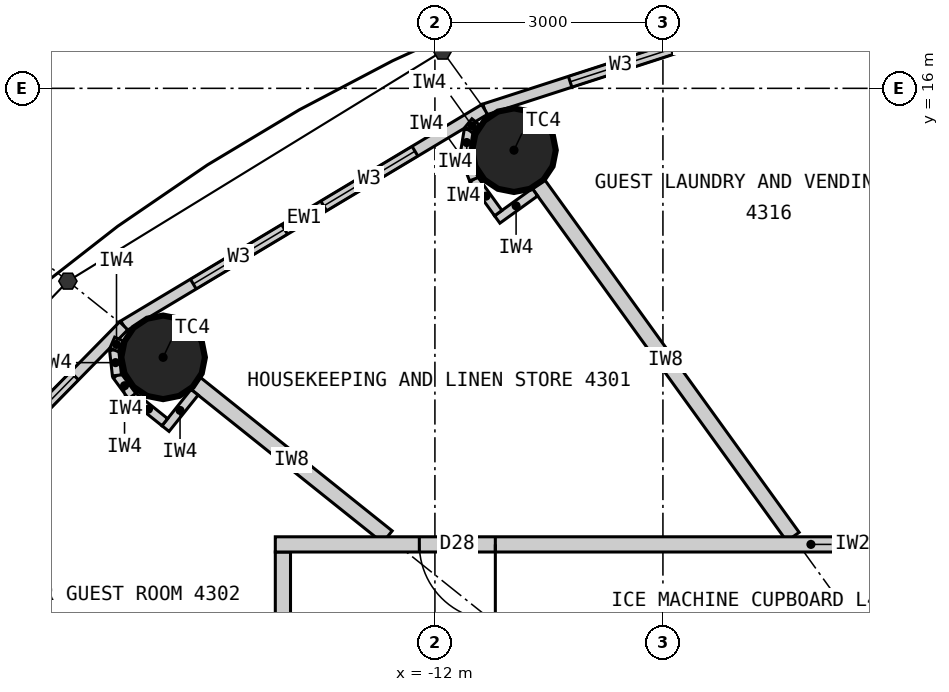
"""IFC4 building model, lengths in metres.
Left out: names, types, materials, properties, quantities, classifications, styles, units other than length and angle.
Written with IfcOpenShell. Run it as: python <this file> out.ifc"""

import sys

from ifc_helpers import new_model, si_unit, direction, frame, frame_2d, origin, origin_2d, place, context, subcontext, project, spatial, rectangle, circle, extrude, element, fill, save


model = new_model("IFC4")
c1 = context("Model", 3, precision=1e-05, world=origin(), true_north=direction((0.0, 1.0)))
c2 = subcontext(c1, "Body", "Model", "MODEL_VIEW")
j1 = project(units=[si_unit("LENGTHUNIT", "METRE"), si_unit("PLANEANGLEUNIT", "RADIAN")], contexts=[c1])
p1 = place(None, origin())
s1 = spatial("IfcSite", under=j1, at=p1, CompositionType="ELEMENT")
p2 = place(p1, origin())
s2 = spatial("IfcBuilding", under=s1, at=p2, CompositionType="ELEMENT")
p3 = place(p2, frame((0.0, 0.0, 163.2)))
s3 = spatial("IfcBuildingStorey", under=s2, at=p3, CompositionType="ELEMENT", Elevation=163.2)
for number, where, z_axis, x_axis in (
    (1, (-10.96, 15.186, 0.0), (0.0, 0.0, 1.0), (1.0, 0.0, 0.0)),
    (2, (-15.576, 12.461, 0.0), (0.0, 0.0, 1.0), (1.0, 0.0, 0.0)),
):
    element("IfcColumn", number, at=place(p3, frame(where, z_axis=z_axis, x_axis=x_axis)), inside=s3, PredefinedType="COLUMN", context=c2, shape_type="SweptSolid", body=[
        extrude(circle(Radius=0.55, at=origin_2d()), origin(), (0.0, 0.0, 1.0), 3.3),
    ])
p4 = place(p3, frame((-5.86, 17.497, 0.0), z_axis=(0.0, 0.0, 1.0), x_axis=(-0.951432482129, -0.307857486429, 0.0)))
e3 = element("IfcWall", 3, at=p4, inside=s3, PredefinedType="ELEMENTEDWALL", context=c2, shape_type="SweptSolid", body=[
    extrude(rectangle(XDim=5.766, YDim=0.15, at=frame_2d((2.883, 0.0))), origin(), (0.0, 0.0, 1.0), 3.12),
])
p5 = place(p4, frame((1.183, 0.0, 0.9)))
e4 = element("IfcOpeningElement", 4, at=p5, cuts=e3, PredefinedType="OPENING", context=c2, shape_type="SweptSolid", body=[
    extrude(rectangle(XDim=1.4, YDim=1.9, at=frame_2d((0.7, 0.95))), frame((0.0, 0.085, 0.0), z_axis=(0.0, -1.0, 0.0), x_axis=(1.0, 0.0, 0.0)), (0.0, 0.0, 1.0), 0.17),
])
p6 = place(p4, frame((3.183, 0.0, 0.9)))
e5 = element("IfcOpeningElement", 5, at=p6, cuts=e3, PredefinedType="OPENING", context=c2, shape_type="SweptSolid", body=[
    extrude(rectangle(XDim=1.4, YDim=1.9, at=frame_2d((0.7, 0.95))), frame((0.0, 0.085, 0.0), z_axis=(0.0, -1.0, 0.0), x_axis=(1.0, 0.0, 0.0)), (0.0, 0.0, 1.0), 0.17),
])
p7 = place(p3, frame((-11.346, 15.722, 0.0), z_axis=(0.0, 0.0, 1.0), x_axis=(-0.857695199231, -0.514158482587, 0.0)))
e6 = element("IfcWall", 6, at=p7, inside=s3, PredefinedType="ELEMENTEDWALL", context=c2, shape_type="SweptSolid", body=[
    extrude(rectangle(XDim=5.536, YDim=0.15, at=frame_2d((2.768, 0.0))), origin(), (0.0, 0.0, 1.0), 3.12),
])
p8 = place(p7, frame((1.068, 0.0, 0.9)))
e7 = element("IfcOpeningElement", 7, at=p8, cuts=e6, PredefinedType="OPENING", context=c2, shape_type="SweptSolid", body=[
    extrude(rectangle(XDim=1.4, YDim=1.9, at=frame_2d((0.7, 0.95))), frame((0.0, 0.085, 0.0), z_axis=(0.0, -1.0, 0.0), x_axis=(1.0, 0.0, 0.0)), (0.0, 0.0, 1.0), 0.17),
])
p9 = place(p7, frame((3.068, 0.0, 0.9)))
e8 = element("IfcOpeningElement", 8, at=p9, cuts=e6, PredefinedType="OPENING", context=c2, shape_type="SweptSolid", body=[
    extrude(rectangle(XDim=1.4, YDim=1.9, at=frame_2d((0.7, 0.95))), frame((0.0, 0.085, 0.0), z_axis=(0.0, -1.0, 0.0), x_axis=(1.0, 0.0, 0.0)), (0.0, 0.0, 1.0), 0.17),
])
p10 = place(p3, frame((-16.095, 12.876, 0.0), z_axis=(0.0, 0.0, 1.0), x_axis=(-0.700727467776, -0.71342905457, 0.0)))
e9 = element("IfcWall", 9, at=p10, inside=s3, PredefinedType="ELEMENTEDWALL", context=c2, shape_type="SweptSolid", body=[
    extrude(rectangle(XDim=5.247, YDim=0.15, at=frame_2d((2.624, 0.0))), origin(), (0.0, 0.0, 1.0), 3.12),
])
p11 = place(p10, frame((0.924, 0.0, 0.9)))
e10 = element("IfcOpeningElement", 10, at=p11, cuts=e9, PredefinedType="OPENING", context=c2, shape_type="SweptSolid", body=[
    extrude(rectangle(XDim=1.4, YDim=1.9, at=frame_2d((0.7, 0.95))), frame((0.0, 0.085, 0.0), z_axis=(0.0, -1.0, 0.0), x_axis=(1.0, 0.0, 0.0)), (0.0, 0.0, 1.0), 0.17),
])
p12 = place(p10, frame((2.924, 0.0, 0.9)))
e11 = element("IfcOpeningElement", 11, at=p12, cuts=e9, PredefinedType="OPENING", context=c2, shape_type="SweptSolid", body=[
    extrude(rectangle(XDim=1.4, YDim=1.9, at=frame_2d((0.7, 0.95))), frame((0.0, 0.085, 0.0), z_axis=(0.0, -1.0, 0.0), x_axis=(1.0, 0.0, 0.0)), (0.0, 0.0, 1.0), 0.17),
])
p13 = place(p3, frame((-7.289, 10.1, 0.0), z_axis=(0.0, 0.0, 1.0), x_axis=(-0.585222595178, 0.810872686735, 0.0)))
e12 = element("IfcWall", 12, at=p13, inside=s3, PredefinedType="PARTITIONING", context=c2, shape_type="SweptSolid", body=[
    extrude(rectangle(XDim=5.722, YDim=0.2, at=frame_2d((2.861, 0.0))), origin(), (0.0, 0.0, 1.0), 2.42),
])
p14 = place(p3, frame((-12.625, 10.1, 0.0), z_axis=(0.0, 0.0, 1.0), x_axis=(-0.780876185034, 0.624685827954, 0.0)))
e13 = element("IfcWall", 13, at=p14, inside=s3, PredefinedType="PARTITIONING", context=c2, shape_type="SweptSolid", body=[
    extrude(rectangle(XDim=3.229, YDim=0.2, at=frame_2d((1.615, 0.0))), origin(), (0.0, 0.0, 1.0), 2.42),
])
p15 = place(p3, frame((-14.0, 9.9, 0.0), z_axis=(0.0, 0.0, 1.0), x_axis=(0.0, -1.0, 0.0)))
e14 = element("IfcWall", 14, at=p15, inside=s3, PredefinedType="PARTITIONING", context=c2, shape_type="SweptSolid", body=[
    extrude(rectangle(XDim=8.23, YDim=0.2, at=frame_2d((4.115, 0.0))), origin(), (0.0, 0.0, 1.0), 3.12),
])
p16 = place(p15, frame((1.678, 0.0, 0.0)))
e15 = element("IfcOpeningElement", 15, at=p16, cuts=e14, PredefinedType="OPENING", context=c2, shape_type="SweptSolid", body=[
    extrude(rectangle(XDim=1.0, YDim=2.2, at=frame_2d((0.5, 1.1))), frame((0.0, 0.11, 0.0), z_axis=(0.0, -1.0, 0.0), x_axis=(1.0, 0.0, 0.0)), (0.0, 0.0, 1.0), 0.22),
])
p17 = place(p3, frame((-14.1, 10.0, 0.0), z_axis=(0.0, 0.0, 1.0), x_axis=(1.0, 0.0, 0.0)))
e16 = element("IfcWall", 16, at=p17, inside=s3, PredefinedType="PARTITIONING", context=c2, shape_type="SweptSolid", body=[
    extrude(rectangle(XDim=14.094, YDim=0.2, at=frame_2d((7.047, 0.0))), origin(), (0.0, 0.0, 1.0), 3.12),
])
p18 = place(p17, frame((1.895, 0.0, 0.0)))
e17 = element("IfcOpeningElement", 17, at=p18, cuts=e16, PredefinedType="OPENING", context=c2, shape_type="SweptSolid", body=[
    extrude(rectangle(XDim=1.0, YDim=2.2, at=frame_2d((0.5, 1.1))), frame((0.0, 0.11, 0.0), z_axis=(0.0, -1.0, 0.0), x_axis=(1.0, 0.0, 0.0)), (0.0, 0.0, 1.0), 0.22),
])
p19 = place(p17, frame((9.297, 0.0, 0.0)))
e18 = element("IfcOpeningElement", 18, at=p19, cuts=e16, PredefinedType="OPENING", context=c2, shape_type="SweptSolid", body=[
    extrude(rectangle(XDim=1.0, YDim=2.2, at=frame_2d((0.5, 1.1))), frame((0.0, 0.11, 0.0), z_axis=(0.0, -1.0, 0.0), x_axis=(1.0, 0.0, 0.0)), (0.0, 0.0, 1.0), 0.22),
])
p20 = place(p3, frame((-10.684, 14.633, 0.0), z_axis=(0.0, 0.0, 1.0), x_axis=(-0.810921075692, -0.585155542568, 0.0)))
e19 = element("IfcWall", 19, at=p20, inside=s3, PredefinedType="PARTITIONING", context=c2, shape_type="SweptSolid", body=[
    extrude(rectangle(XDim=0.612, YDim=0.12, at=frame_2d((0.306, 0.0))), origin(), (0.0, 0.0, 1.0), 3.12),
])
p21 = place(p3, frame((-11.167, 14.359, 0.0), z_axis=(0.0, 0.0, 1.0), x_axis=(-0.585263549799, 0.810843127415, 0.0)))
e20 = element("IfcWall", 20, at=p21, inside=s3, PredefinedType="PARTITIONING", context=c2, shape_type="SweptSolid", body=[
    extrude(rectangle(XDim=0.55, YDim=0.12, at=frame_2d((0.275, 0.0))), origin(), (0.0, 0.0, 1.0), 3.12),
])
for number, where, z_axis, x_axis in (
    (21, (-11.489, 14.804, 0.0), (0.0, 0.0, 1.0), (-0.356, 0.935, 0.0)),
    (22, (-11.609, 15.12, 0.0), (0.0, 0.0, 1.0), (0.16, 0.987, 0.0)),
):
    element("IfcWall", number, at=place(p3, frame(where, z_axis=z_axis, x_axis=x_axis)), inside=s3, PredefinedType="PARTITIONING", context=c2, shape_type="SweptSolid", body=[
        extrude(rectangle(XDim=0.338, YDim=0.12, at=frame_2d((0.169, 0.0))), origin(), (0.0, 0.0, 1.0), 3.12),
    ])
p22 = place(p3, frame((-11.555, 15.453, 0.0), z_axis=(0.0, 0.0, 1.0), x_axis=(0.631711901025, 0.775203246964, 0.0)))
e23 = element("IfcWall", 23, at=p22, inside=s3, PredefinedType="PARTITIONING", context=c2, shape_type="SweptSolid", body=[
    extrude(rectangle(XDim=0.139, YDim=0.12, at=frame_2d((0.07, 0.0))), origin(), (0.0, 0.0, 1.0), 3.12),
])
p23 = place(p3, frame((-15.162, 12.002, 0.0), z_axis=(0.0, 0.0, 1.0), x_axis=(-0.624597762427, -0.780946627607, 0.0)))
e24 = element("IfcWall", 24, at=p23, inside=s3, PredefinedType="PARTITIONING", context=c2, shape_type="SweptSolid", body=[
    extrude(rectangle(XDim=0.612, YDim=0.12, at=frame_2d((0.306, 0.0))), origin(), (0.0, 0.0, 1.0), 3.12),
])
p24 = place(p3, frame((-15.554, 11.608, 0.0), z_axis=(0.0, 0.0, 1.0), x_axis=(-0.780695577787, 0.624911525597, 0.0)))
e25 = element("IfcWall", 25, at=p24, inside=s3, PredefinedType="PARTITIONING", context=c2, shape_type="SweptSolid", body=[
    extrude(rectangle(XDim=0.55, YDim=0.12, at=frame_2d((0.275, 0.0))), origin(), (0.0, 0.0, 1.0), 3.12),
])
p25 = place(p3, frame((-15.984, 11.952, 0.0), z_axis=(0.0, 0.0, 1.0), x_axis=(-0.592335221171, 0.805691619517, 0.0)))
e26 = element("IfcWall", 26, at=p25, inside=s3, PredefinedType="PARTITIONING", context=c2, shape_type="SweptSolid", body=[
    extrude(rectangle(XDim=0.338, YDim=0.12, at=frame_2d((0.169, 0.0))), origin(), (0.0, 0.0, 1.0), 3.12),
])
p26 = place(p3, frame((-16.184, 12.224, 0.0), z_axis=(0.0, 0.0, 1.0), x_axis=(-0.110669692975, 0.993857242795, 0.0)))
e27 = element("IfcWall", 27, at=p26, inside=s3, PredefinedType="PARTITIONING", context=c2, shape_type="SweptSolid", body=[
    extrude(rectangle(XDim=0.337, YDim=0.12, at=frame_2d((0.169, 0.0))), origin(), (0.0, 0.0, 1.0), 3.12),
])
p27 = place(p3, frame((-16.221, 12.559, 0.0), z_axis=(0.0, 0.0, 1.0), x_axis=(0.401064416249, 0.916049853457, 0.0)))
e28 = element("IfcWall", 28, at=p27, inside=s3, PredefinedType="PARTITIONING", context=c2, shape_type="SweptSolid", body=[
    extrude(rectangle(XDim=0.156, YDim=0.12, at=frame_2d((0.078, 0.0))), origin(), (0.0, 0.0, 1.0), 3.12),
])
p28 = place(p6, origin())
e29 = element("IfcWindow", 29, at=p28, inside=s3, PartitioningType="SINGLE_PANEL", PredefinedType="WINDOW", context=c2, shape_type="SweptSolid", body=[
    extrude(rectangle(XDim=1.4, YDim=1.9, at=frame_2d((0.7, 0.95))), frame((0.0, 0.03, 0.0), z_axis=(0.0, -1.0, 0.0), x_axis=(1.0, 0.0, 0.0)), (0.0, 0.0, 1.0), 0.06),
])
fill(e5, e29)
p29 = place(p8, origin())
e30 = element("IfcWindow", 30, at=p29, inside=s3, PartitioningType="SINGLE_PANEL", PredefinedType="WINDOW", context=c2, shape_type="SweptSolid", body=[
    extrude(rectangle(XDim=1.4, YDim=1.9, at=frame_2d((0.7, 0.95))), frame((0.0, 0.03, 0.0), z_axis=(0.0, -1.0, 0.0), x_axis=(1.0, 0.0, 0.0)), (0.0, 0.0, 1.0), 0.06),
])
fill(e7, e30)
p30 = place(p9, origin())
e31 = element("IfcWindow", 31, at=p30, inside=s3, PartitioningType="SINGLE_PANEL", PredefinedType="WINDOW", context=c2, shape_type="SweptSolid", body=[
    extrude(rectangle(XDim=1.4, YDim=1.9, at=frame_2d((0.7, 0.95))), frame((0.0, 0.03, 0.0), z_axis=(0.0, -1.0, 0.0), x_axis=(1.0, 0.0, 0.0)), (0.0, 0.0, 1.0), 0.06),
])
fill(e8, e31)
p31 = place(p11, origin())
e32 = element("IfcWindow", 32, at=p31, inside=s3, PartitioningType="SINGLE_PANEL", PredefinedType="WINDOW", context=c2, shape_type="SweptSolid", body=[
    extrude(rectangle(XDim=1.4, YDim=1.9, at=frame_2d((0.7, 0.95))), frame((0.0, 0.03, 0.0), z_axis=(0.0, -1.0, 0.0), x_axis=(1.0, 0.0, 0.0)), (0.0, 0.0, 1.0), 0.06),
])
fill(e10, e32)
p32 = place(p18, origin())
e33 = element("IfcDoor", 33, at=p32, inside=s3, OperationType="SINGLE_SWING_RIGHT", PredefinedType="DOOR", context=c2, shape_type="SweptSolid", body=[
    extrude(rectangle(XDim=1.0, YDim=2.2, at=frame_2d((0.5, 1.1))), frame((0.0, 0.025, 0.0), z_axis=(0.0, -1.0, 0.0), x_axis=(1.0, 0.0, 0.0)), (0.0, 0.0, 1.0), 0.05),
])
fill(e17, e33)
save(model, sys.argv[1])
